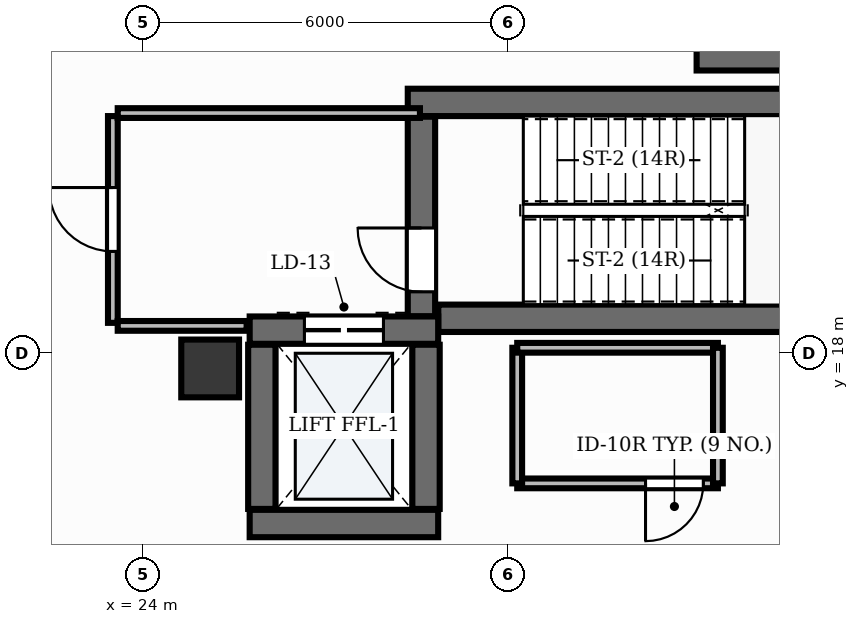
"""IFC4 building model, lengths in metres.
Left out: names, types, materials, properties, quantities, classifications, styles, units other than length and angle.
Written with IfcOpenShell. Run it as: python <this file> out.ifc"""

import sys

from ifc_helpers import new_model, si_unit, direction, frame, frame_2d, origin, origin_2d, place, context, subcontext, project, spatial, rectangle, extrude, element, fill, save


model = new_model("IFC4")
c1 = context("Model", 3, precision=1e-05, world=origin(), true_north=direction((0.0, 1.0)))
c2 = subcontext(c1, "Body", "Model", "MODEL_VIEW")
j1 = project(units=[si_unit("LENGTHUNIT", "METRE"), si_unit("PLANEANGLEUNIT", "RADIAN")], contexts=[c1])
p1 = place(None, origin())
s1 = spatial("IfcSite", under=j1, at=p1, CompositionType="ELEMENT")
p2 = place(p1, origin())
s2 = spatial("IfcBuilding", under=s1, at=p2, CompositionType="ELEMENT")
p3 = place(p2, frame((0.0, 0.0, 5.4)))
s3 = spatial("IfcBuildingStorey", under=s2, at=p3, CompositionType="ELEMENT", Elevation=5.4)
p4 = place(p3, frame((28.852, 18.575, 0.0), z_axis=(0.0, 0.0, 1.0), x_axis=(1.0, 0.0, 0.0)))
e1 = element("IfcWall", 1, at=p4, inside=s3, PredefinedType="SHEAR", context=c2, shape_type="SweptSolid", body=[
    extrude(rectangle(XDim=8.248, YDim=0.45, at=frame_2d((4.124, 0.0))), origin(), (0.0, 0.0, 1.0), 4.5),
])
p5 = place(p3, frame((28.35, 22.125, 0.0), z_axis=(0.0, 0.0, 1.0), x_axis=(1.0, 0.0, 0.0)))
e2 = element("IfcWall", 2, at=p5, inside=s3, PredefinedType="SHEAR", context=c2, shape_type="SweptSolid", body=[
    extrude(rectangle(XDim=8.75, YDim=0.45, at=frame_2d((4.375, 0.0))), origin(), (0.0, 0.0, 1.0), 4.5),
])
p6 = place(p3, frame((28.575, 18.607, 0.0), z_axis=(0.0, 0.0, 1.0), x_axis=(0.0, 1.0, 0.0)))
e3 = element("IfcWall", 3, at=p6, inside=s3, PredefinedType="SHEAR", context=c2, shape_type="SweptSolid", body=[
    extrude(rectangle(XDim=3.283, YDim=0.45, at=frame_2d((1.642, 0.0))), origin(), (0.0, 0.0, 1.0), 4.5),
])
p7 = place(p6, frame((0.403, 0.0, 0.0)))
e4 = element("IfcOpeningElement", 4, at=p7, cuts=e3, PredefinedType="OPENING", context=c2, shape_type="SweptSolid", body=[
    extrude(rectangle(XDim=1.05, YDim=2.15, at=frame_2d((0.525, 1.075))), frame((0.0, 0.24, 0.0), z_axis=(0.0, -1.0, 0.0), x_axis=(1.0, 0.0, 0.0)), (0.0, 0.0, 1.0), 0.48),
])
p8 = place(p3, frame((33.1, 22.875, 0.0), z_axis=(0.0, 0.0, 1.0), x_axis=(1.0, 0.0, 0.0)))
e5 = element("IfcWall", 5, at=p8, inside=s3, PredefinedType="SHEAR", context=c2, shape_type="SweptSolid", body=[
    extrude(rectangle(XDim=4.0, YDim=0.45, at=frame_2d((2.0, 0.0))), origin(), (0.0, 0.0, 1.0), 4.5),
])
p9 = place(p3, frame((25.75, 15.2, 0.0), z_axis=(0.0, 0.0, 1.0), x_axis=(1.0, 0.0, 0.0)))
e6 = element("IfcWall", 6, at=p9, inside=s3, PredefinedType="SHEAR", context=c2, shape_type="SweptSolid", body=[
    extrude(rectangle(XDim=3.1, YDim=0.45, at=frame_2d((1.55, 0.0))), origin(), (0.0, 0.0, 1.0), 4.5),
])
p10 = place(p3, frame((25.75, 18.38, 0.0), z_axis=(0.0, 0.0, 1.0), x_axis=(1.0, 0.0, 0.0)))
e7 = element("IfcWall", 7, at=p10, inside=s3, PredefinedType="SHEAR", context=c2, shape_type="SweptSolid", body=[
    extrude(rectangle(XDim=3.1, YDim=0.45, at=frame_2d((1.55, 0.0))), origin(), (0.0, 0.0, 1.0), 4.5),
])
p11 = place(p10, frame((0.9, 0.0, 0.0)))
e8 = element("IfcOpeningElement", 8, at=p11, cuts=e7, PredefinedType="OPENING", context=c2, shape_type="SweptSolid", body=[
    extrude(rectangle(XDim=1.3, YDim=2.2, at=frame_2d((0.65, 1.1))), frame((0.0, 0.24, 0.0), z_axis=(0.0, -1.0, 0.0), x_axis=(1.0, 0.0, 0.0)), (0.0, 0.0, 1.0), 0.48),
])
for number, where, z_axis, x_axis in (
    (9, (25.95, 15.44, 0.0), (0.0, 0.0, 1.0), (0.0, 1.0, 0.0)),
    (10, (28.65, 15.44, 0.0), (0.0, 0.0, 1.0), (0.0, 1.0, 0.0)),
):
    element("IfcWall", number, at=place(p3, frame(where, z_axis=z_axis, x_axis=x_axis)), inside=s3, PredefinedType="SHEAR", context=c2, shape_type="SweptSolid", body=[
        extrude(rectangle(XDim=2.7, YDim=0.45, at=frame_2d((1.35, 0.0))), origin(), (0.0, 0.0, 1.0), 4.5),
    ])
p12 = place(p3, frame((25.1, 17.75, -0.0), z_axis=(0.0, 0.0, 1.0), x_axis=(1.0, 0.0, 0.0)))
e11 = element("IfcColumn", 11, at=p12, inside=s3, PredefinedType="PILASTER", context=c2, shape_type="SweptSolid", body=[
    extrude(rectangle(XDim=0.95, YDim=0.95, at=origin_2d()), origin(), (0.0, 0.0, 1.0), 4.501),
])
p13 = place(p3, frame((23.5, 18.5, 0.0), z_axis=(0.0, 0.0, 1.0), x_axis=(0.0, 1.0, 0.0)))
e12 = element("IfcWall", 12, at=p13, inside=s3, PredefinedType="PARTITIONING", context=c2, shape_type="SweptSolid", body=[
    extrude(rectangle(XDim=3.4, YDim=0.16, at=frame_2d((1.7, 0.0))), origin(), (0.0, 0.0, 1.0), 3.51),
])
p14 = place(p13, frame((1.175, 0.0, 0.0)))
e13 = element("IfcOpeningElement", 13, at=p14, cuts=e12, PredefinedType="OPENING", context=c2, shape_type="SweptSolid", body=[
    extrude(rectangle(XDim=1.05, YDim=2.15, at=frame_2d((0.525, 1.075))), frame((0.0, 0.095, 0.0), z_axis=(0.0, -1.0, 0.0), x_axis=(1.0, 0.0, 0.0)), (0.0, 0.0, 1.0), 0.19),
])
p15 = place(p3, frame((23.58, 21.95, 0.0), z_axis=(0.0, 0.0, 1.0), x_axis=(1.0, 0.0, 0.0)))
e14 = element("IfcWall", 14, at=p15, inside=s3, PredefinedType="PARTITIONING", context=c2, shape_type="SweptSolid", body=[
    extrude(rectangle(XDim=4.97, YDim=0.16, at=frame_2d((2.485, 0.0))), origin(), (0.0, 0.0, 1.0), 3.51),
])
p16 = place(p3, frame((23.58, 18.45, 0.0), z_axis=(0.0, 0.0, 1.0), x_axis=(1.0, 0.0, 0.0)))
e15 = element("IfcWall", 15, at=p16, inside=s3, PredefinedType="PARTITIONING", context=c2, shape_type="SweptSolid", body=[
    extrude(rectangle(XDim=2.12, YDim=0.16, at=frame_2d((1.06, 0.0))), origin(), (0.0, 0.0, 1.0), 3.51),
])
p17 = place(p3, frame((33.45, 15.86, 0.0), z_axis=(0.0, 0.0, 1.0), x_axis=(-1.0, 0.0, 0.0)))
e16 = element("IfcWall", 16, at=p17, inside=s3, PredefinedType="PARTITIONING", context=c2, shape_type="SweptSolid", body=[
    extrude(rectangle(XDim=3.3, YDim=0.16, at=frame_2d((1.65, 0.0))), origin(), (0.0, 0.0, 1.0), 3.51),
])
p18 = place(p17, frame((0.24, 0.0, 0.0)))
e17 = element("IfcOpeningElement", 17, at=p18, cuts=e16, PredefinedType="OPENING", context=c2, shape_type="SweptSolid", body=[
    extrude(rectangle(XDim=0.95, YDim=2.15, at=frame_2d((0.475, 1.075))), frame((0.0, 0.095, 0.0), z_axis=(0.0, -1.0, 0.0), x_axis=(1.0, 0.0, 0.0)), (0.0, 0.0, 1.0), 0.19),
])
p19 = place(p3, frame((30.15, 15.86, 0.0), z_axis=(0.0, 0.0, 1.0), x_axis=(0.0, 1.0, 0.0)))
e18 = element("IfcWall", 18, at=p19, inside=s3, PredefinedType="PARTITIONING", context=c2, shape_type="SweptSolid", body=[
    extrude(rectangle(XDim=2.23, YDim=0.16, at=frame_2d((1.115, 0.0))), origin(), (0.0, 0.0, 1.0), 3.51),
])
p20 = place(p3, frame((30.15, 18.09, 0.0), z_axis=(0.0, 0.0, 1.0), x_axis=(1.0, 0.0, 0.0)))
e19 = element("IfcWall", 19, at=p20, inside=s3, PredefinedType="PARTITIONING", context=c2, shape_type="SweptSolid", body=[
    extrude(rectangle(XDim=3.3, YDim=0.16, at=frame_2d((1.65, 0.0))), origin(), (0.0, 0.0, 1.0), 3.51),
])
p21 = place(p3, frame((33.45, 18.09, 0.0), z_axis=(0.0, 0.0, 1.0), x_axis=(0.0, -1.0, 0.0)))
e20 = element("IfcWall", 20, at=p21, inside=s3, PredefinedType="PARTITIONING", context=c2, shape_type="SweptSolid", body=[
    extrude(rectangle(XDim=2.23, YDim=0.16, at=frame_2d((1.115, 0.0))), origin(), (0.0, 0.0, 1.0), 3.51),
])
p22 = place(p7, origin())
e21 = element("IfcDoor", 21, at=p22, inside=s3, OperationType="SINGLE_SWING_RIGHT", PredefinedType="DOOR", context=c2, shape_type="SweptSolid", body=[
    extrude(rectangle(XDim=1.05, YDim=2.15, at=frame_2d((0.525, 1.075))), frame((0.0, 0.025, 0.0), z_axis=(0.0, -1.0, 0.0), x_axis=(1.0, 0.0, 0.0)), (0.0, 0.0, 1.0), 0.05),
])
fill(e4, e21)
p23 = place(p11, origin())
e22 = element("IfcDoor", 22, at=p23, inside=s3, OperationType="DOUBLE_DOOR_SLIDING", PredefinedType="DOOR", context=c2, shape_type="SweptSolid", body=[
    extrude(rectangle(XDim=1.3, YDim=2.2, at=frame_2d((0.65, 1.1))), frame((0.0, 0.025, 0.0), z_axis=(0.0, -1.0, 0.0), x_axis=(1.0, 0.0, 0.0)), (0.0, 0.0, 1.0), 0.05),
])
fill(e8, e22)
p24 = place(p14, origin())
e23 = element("IfcDoor", 23, at=p24, inside=s3, OperationType="SINGLE_SWING_RIGHT", PredefinedType="DOOR", context=c2, shape_type="SweptSolid", body=[
    extrude(rectangle(XDim=1.05, YDim=2.15, at=frame_2d((0.525, 1.075))), frame((0.0, 0.025, 0.0), z_axis=(0.0, -1.0, 0.0), x_axis=(1.0, 0.0, 0.0)), (0.0, 0.0, 1.0), 0.05),
])
fill(e13, e23)
p25 = place(p18, origin())
e24 = element("IfcDoor", 24, at=p25, inside=s3, OperationType="SINGLE_SWING_RIGHT", PredefinedType="DOOR", context=c2, shape_type="SweptSolid", body=[
    extrude(rectangle(XDim=0.95, YDim=2.15, at=frame_2d((0.475, 1.075))), frame((0.0, 0.025, 0.0), z_axis=(0.0, -1.0, 0.0), x_axis=(1.0, 0.0, 0.0)), (0.0, 0.0, 1.0), 0.05),
])
fill(e17, e24)
save(model, sys.argv[1])
